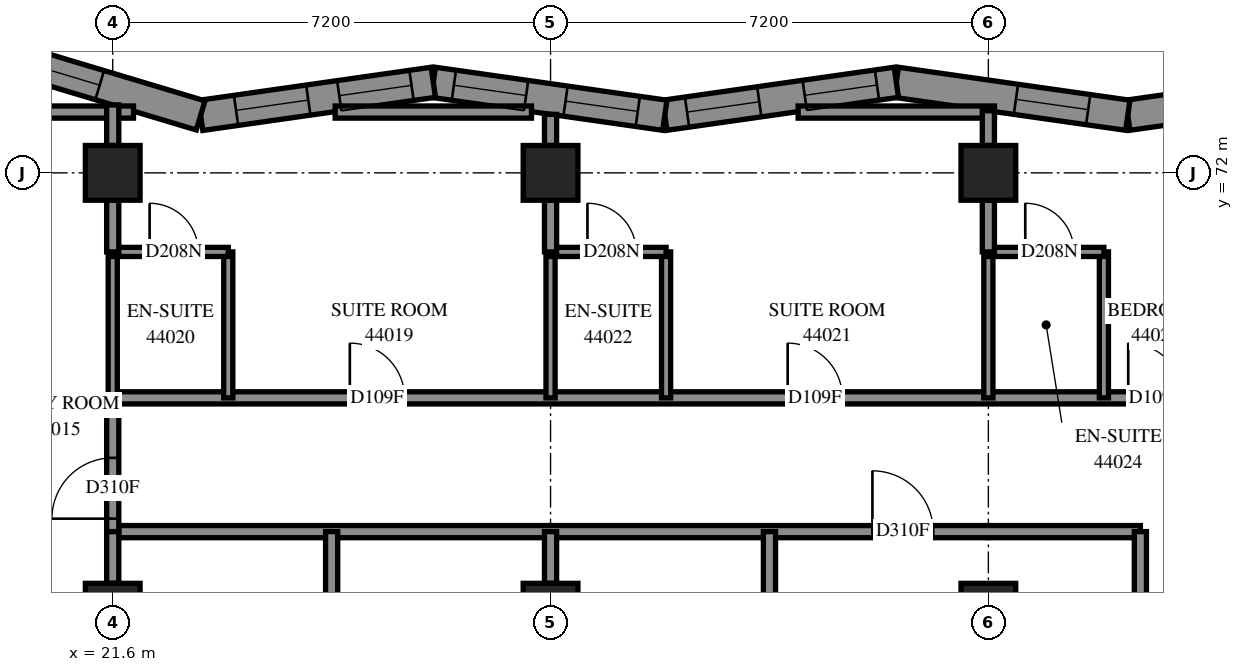
"""IFC4 building model, lengths in metres.
Left out: names, types, materials, properties, quantities, classifications, styles, units other than length and angle.
Written with IfcOpenShell. Run it as: python <this file> out.ifc"""

import sys

from ifc_helpers import new_model, si_unit, direction, frame, frame_2d, origin, origin_2d, place, context, subcontext, project, spatial, polyline, rectangle, outline, extrude, element, fill, save


model = new_model("IFC4")
c1 = context("Model", 3, precision=1e-05, world=origin(), true_north=direction((0.0, 1.0)))
c2 = subcontext(c1, "Body", "Model", "MODEL_VIEW")
j1 = project(units=[si_unit("LENGTHUNIT", "METRE"), si_unit("PLANEANGLEUNIT", "RADIAN")], contexts=[c1])
p1 = place(None, origin())
s1 = spatial("IfcSite", under=j1, at=p1, CompositionType="ELEMENT")
p2 = place(p1, origin())
s2 = spatial("IfcBuilding", under=s1, at=p2, CompositionType="ELEMENT")
p3 = place(p2, frame((0.0, 0.0, 162.6)))
s3 = spatial("IfcBuildingStorey", under=s2, at=p3, CompositionType="ELEMENT", Elevation=162.6)
for number, where, z_axis, x_axis in (
    (1, (21.6, 64.8, 0.0), (0.0, 0.0, 1.0), (1.0, 0.0, 0.0)),
    (2, (21.6, 72.0, 0.0), (0.0, 0.0, 1.0), (1.0, 0.0, 0.0)),
    (3, (28.8, 64.8, 0.0), (0.0, 0.0, 1.0), (1.0, 0.0, 0.0)),
    (4, (28.8, 72.0, 0.0), (0.0, 0.0, 1.0), (1.0, 0.0, 0.0)),
    (5, (36.0, 64.8, 0.0), (0.0, 0.0, 1.0), (1.0, 0.0, 0.0)),
    (6, (36.0, 72.0, 0.0), (0.0, 0.0, 1.0), (1.0, 0.0, 0.0)),
):
    element("IfcColumn", number, at=place(p3, frame(where, z_axis=z_axis, x_axis=x_axis)), inside=s3, PredefinedType="COLUMN", context=c2, shape_type="SweptSolid", body=[
        extrude(rectangle(XDim=0.9, YDim=0.9, at=origin_2d()), origin(), (0.0, 0.0, 1.0), 3.1),
    ])
p4 = place(p3, frame((42.1, 73.49, 0.0), z_axis=(0.0, 0.0, 1.0), x_axis=(-0.990016994, -0.1409480459, 0.0)))
e7 = element("IfcWall", 7, at=p4, inside=s3, PredefinedType="SOLIDWALL", context=c2, shape_type="SweptSolid", body=[
    extrude(outline(polyline([(-0.036, -0.25), (3.81, -0.25), (3.881, 0.25), (0.036, 0.25), (-0.036, -0.25)])), origin(), (0.0, 0.0, 1.0), 3.1),
])
p5 = place(p4, frame((0.33, 0.0, 0.45)))
e8 = element("IfcOpeningElement", 8, at=p5, cuts=e7, PredefinedType="OPENING", context=c2, shape_type="SweptSolid", body=[
    extrude(rectangle(XDim=1.2, YDim=2.5, at=frame_2d((0.6, 1.25))), frame((0.0, 0.26, 0.0), z_axis=(0.0, -1.0, 0.0), x_axis=(1.0, 0.0, 0.0)), (0.0, 0.0, 1.0), 0.52),
])
p6 = place(p3, frame((38.293, 72.948, 0.0), z_axis=(0.0, 0.0, 1.0), x_axis=(-0.990016994, 0.1409480459, 0.0)))
e9 = element("IfcWall", 9, at=p6, inside=s3, PredefinedType="SOLIDWALL", context=c2, shape_type="SweptSolid", body=[
    extrude(outline(polyline([(0.036, -0.25), (3.881, -0.25), (3.81, 0.25), (-0.036, 0.25), (0.036, -0.25)])), origin(), (0.0, 0.0, 1.0), 3.1),
])
p7 = place(p6, frame((0.658, 0.0, 0.45)))
e10 = element("IfcOpeningElement", 10, at=p7, cuts=e9, PredefinedType="OPENING", context=c2, shape_type="SweptSolid", body=[
    extrude(rectangle(XDim=1.2, YDim=2.5, at=frame_2d((0.6, 1.25))), frame((0.0, 0.26, 0.0), z_axis=(0.0, -1.0, 0.0), x_axis=(1.0, 0.0, 0.0)), (0.0, 0.0, 1.0), 0.52),
])
p8 = place(p3, frame((34.486, 73.49, 0.0), z_axis=(0.0, 0.0, 1.0), x_axis=(-0.990016994, -0.1409480459, 0.0)))
e11 = element("IfcWall", 11, at=p8, inside=s3, PredefinedType="SOLIDWALL", context=c2, shape_type="SweptSolid", body=[
    extrude(outline(polyline([(-0.036, -0.25), (3.81, -0.25), (3.881, 0.25), (0.036, 0.25), (-0.036, -0.25)])), origin(), (0.0, 0.0, 1.0), 3.1),
])
p9 = place(p8, frame((0.321, 0.0, 0.45)))
e12 = element("IfcOpeningElement", 12, at=p9, cuts=e11, PredefinedType="OPENING", context=c2, shape_type="SweptSolid", body=[
    extrude(rectangle(XDim=1.2, YDim=2.5, at=frame_2d((0.6, 1.25))), frame((0.0, 0.26, 0.0), z_axis=(0.0, -1.0, 0.0), x_axis=(1.0, 0.0, 0.0)), (0.0, 0.0, 1.0), 0.52),
])
p10 = place(p8, frame((2.276, 0.0, 0.45)))
e13 = element("IfcOpeningElement", 13, at=p10, cuts=e11, PredefinedType="OPENING", context=c2, shape_type="SweptSolid", body=[
    extrude(rectangle(XDim=1.2, YDim=2.5, at=frame_2d((0.6, 1.25))), frame((0.0, 0.26, 0.0), z_axis=(0.0, -1.0, 0.0), x_axis=(1.0, 0.0, 0.0)), (0.0, 0.0, 1.0), 0.52),
])
p11 = place(p3, frame((30.679, 72.948, 0.0), z_axis=(0.0, 0.0, 1.0), x_axis=(-0.990016994, 0.1409480459, 0.0)))
e14 = element("IfcWall", 14, at=p11, inside=s3, PredefinedType="SOLIDWALL", context=c2, shape_type="SweptSolid", body=[
    extrude(outline(polyline([(0.036, -0.25), (3.881, -0.25), (3.81, 0.25), (-0.036, 0.25), (0.036, -0.25)])), origin(), (0.0, 0.0, 1.0), 3.1),
])
p12 = place(p11, frame((0.449, 0.0, 0.45)))
e15 = element("IfcOpeningElement", 15, at=p12, cuts=e14, PredefinedType="OPENING", context=c2, shape_type="SweptSolid", body=[
    extrude(rectangle(XDim=1.2, YDim=2.5, at=frame_2d((0.6, 1.25))), frame((0.0, 0.26, 0.0), z_axis=(0.0, -1.0, 0.0), x_axis=(1.0, 0.0, 0.0)), (0.0, 0.0, 1.0), 0.52),
])
p13 = place(p11, frame((2.304, 0.0, 0.45)))
e16 = element("IfcOpeningElement", 16, at=p13, cuts=e14, PredefinedType="OPENING", context=c2, shape_type="SweptSolid", body=[
    extrude(rectangle(XDim=1.2, YDim=2.5, at=frame_2d((0.6, 1.25))), frame((0.0, 0.26, 0.0), z_axis=(0.0, -1.0, 0.0), x_axis=(1.0, 0.0, 0.0)), (0.0, 0.0, 1.0), 0.52),
])
p14 = place(p3, frame((26.872, 73.49, 0.0), z_axis=(0.0, 0.0, 1.0), x_axis=(-0.9900145925, -0.140964913, 0.0)))
e17 = element("IfcWall", 17, at=p14, inside=s3, PredefinedType="SOLIDWALL", context=c2, shape_type="SweptSolid", body=[
    extrude(outline(polyline([(-0.036, -0.25), (3.81, -0.25), (3.92, 0.25), (0.036, 0.25), (-0.036, -0.25)])), origin(), (0.0, 0.0, 1.0), 3.1),
])
p15 = place(p14, frame((0.362, 0.0, 0.45)))
e18 = element("IfcOpeningElement", 18, at=p15, cuts=e17, PredefinedType="OPENING", context=c2, shape_type="SweptSolid", body=[
    extrude(rectangle(XDim=1.2, YDim=2.5, at=frame_2d((0.6, 1.25))), frame((0.0, 0.26, 0.0), z_axis=(0.0, -1.0, 0.0), x_axis=(1.0, 0.0, 0.0)), (0.0, 0.0, 1.0), 0.52),
])
p16 = place(p14, frame((2.077, 0.0, 0.45)))
e19 = element("IfcOpeningElement", 19, at=p16, cuts=e17, PredefinedType="OPENING", context=c2, shape_type="SweptSolid", body=[
    extrude(rectangle(XDim=1.2, YDim=2.5, at=frame_2d((0.6, 1.25))), frame((0.0, 0.26, 0.0), z_axis=(0.0, -1.0, 0.0), x_axis=(1.0, 0.0, 0.0)), (0.0, 0.0, 1.0), 0.52),
])
p17 = place(p3, frame((23.046, 72.945, 0.0), z_axis=(0.0, 0.0, 1.0), x_axis=(-0.9578292658, 0.2873379501, 0.0)))
e20 = element("IfcWall", 20, at=p17, inside=s3, PredefinedType="SOLIDWALL", context=c2, shape_type="SweptSolid", body=[
    extrude(outline(polyline([(0.055, -0.25), (4.03, -0.25), (3.358, 0.25), (-0.055, 0.25), (0.055, -0.25)])), origin(), (0.0, 0.0, 1.0), 3.1),
])
p18 = place(p17, frame((1.734, 0.0, 0.45)))
e21 = element("IfcOpeningElement", 21, at=p18, cuts=e20, PredefinedType="OPENING", context=c2, shape_type="SweptSolid", body=[
    extrude(rectangle(XDim=1.2, YDim=2.5, at=frame_2d((0.6, 1.25))), frame((0.0, 0.26, 0.0), z_axis=(0.0, -1.0, 0.0), x_axis=(1.0, 0.0, 0.0)), (0.0, 0.0, 1.0), 0.52),
])
p19 = place(p3, frame((21.6, 68.3, 0.0), z_axis=(0.0, 0.0, 1.0), x_axis=(1.0, 0.0, 0.0)))
e22 = element("IfcWall", 22, at=p19, inside=s3, PredefinedType="PARTITIONING", context=c2, shape_type="SweptSolid", body=[
    extrude(rectangle(XDim=19.1, YDim=0.2, at=frame_2d((9.55, 0.0))), origin(), (0.0, 0.0, 1.0), 3.1),
])
p20 = place(p19, frame((3.899, 0.0, 0.0)))
e23 = element("IfcOpeningElement", 23, at=p20, cuts=e22, PredefinedType="OPENING", context=c2, shape_type="SweptSolid", body=[
    extrude(rectangle(XDim=0.9, YDim=2.1, at=frame_2d((0.45, 1.05))), frame((0.0, 0.11, 0.0), z_axis=(0.0, -1.0, 0.0), x_axis=(1.0, 0.0, 0.0)), (0.0, 0.0, 1.0), 0.22),
])
p21 = place(p19, frame((11.099, 0.0, 0.0)))
e24 = element("IfcOpeningElement", 24, at=p21, cuts=e22, PredefinedType="OPENING", context=c2, shape_type="SweptSolid", body=[
    extrude(rectangle(XDim=0.9, YDim=2.1, at=frame_2d((0.45, 1.05))), frame((0.0, 0.11, 0.0), z_axis=(0.0, -1.0, 0.0), x_axis=(1.0, 0.0, 0.0)), (0.0, 0.0, 1.0), 0.22),
])
p22 = place(p19, frame((16.7, 0.0, 0.0)))
e25 = element("IfcOpeningElement", 25, at=p22, cuts=e22, PredefinedType="OPENING", context=c2, shape_type="SweptSolid", body=[
    extrude(rectangle(XDim=0.9, YDim=2.1, at=frame_2d((0.45, 1.05))), frame((0.0, 0.11, 0.0), z_axis=(0.0, -1.0, 0.0), x_axis=(1.0, 0.0, 0.0)), (0.0, 0.0, 1.0), 0.22),
])
p23 = place(p3, frame((21.6, 66.1, 0.0), z_axis=(0.0, 0.0, 1.0), x_axis=(1.0, 0.0, 0.0)))
e26 = element("IfcWall", 26, at=p23, inside=s3, PredefinedType="PARTITIONING", context=c2, shape_type="SweptSolid", body=[
    extrude(rectangle(XDim=16.9, YDim=0.2, at=frame_2d((8.45, 0.0))), origin(), (0.0, 0.0, 1.0), 3.1),
])
p24 = place(p23, frame((12.493, 0.0, 0.0)))
e27 = element("IfcOpeningElement", 27, at=p24, cuts=e26, PredefinedType="OPENING", context=c2, shape_type="SweptSolid", body=[
    extrude(rectangle(XDim=1.0, YDim=2.1, at=frame_2d((0.5, 1.05))), frame((0.0, 0.11, 0.0), z_axis=(0.0, -1.0, 0.0), x_axis=(1.0, 0.0, 0.0)), (0.0, 0.0, 1.0), 0.22),
])
for number, where, z_axis, x_axis in (
    (28, (32.872, 73.0, 0.0), (0.0, 0.0, 1.0), (1.0, 0.0, 0.0)),
    (29, (25.258, 73.0, 0.0), (0.0, 0.0, 1.0), (1.0, 0.0, 0.0)),
):
    element("IfcWall", number, at=place(p3, frame(where, z_axis=z_axis, x_axis=x_axis)), inside=s3, PredefinedType="PARTITIONING", context=c2, shape_type="SweptSolid", body=[
        extrude(rectangle(XDim=3.229, YDim=0.2, at=frame_2d((1.614, 0.0))), origin(), (0.0, 0.0, 1.0), 3.1),
    ])
for number, where, z_axis, x_axis in (
    (30, (25.2, 62.958, 0.0), (0.0, 0.0, 1.0), (0.0, 1.0, 0.0)),
    (31, (32.4, 62.958, 0.0), (0.0, 0.0, 1.0), (0.0, 1.0, 0.0)),
):
    element("IfcWall", number, at=place(p3, frame(where, z_axis=z_axis, x_axis=x_axis)), inside=s3, PredefinedType="PARTITIONING", context=c2, shape_type="SweptSolid", body=[
        extrude(rectangle(XDim=3.142, YDim=0.2, at=frame_2d((1.571, 0.0))), origin(), (0.0, 0.0, 1.0), 3.1),
    ])
p25 = place(p3, frame((38.5, 63.502, 0.0), z_axis=(0.0, 0.0, 1.0), x_axis=(0.0, 1.0, 0.0)))
e32 = element("IfcWall", 32, at=p25, inside=s3, PredefinedType="PARTITIONING", context=c2, shape_type="SweptSolid", body=[
    extrude(rectangle(XDim=2.598, YDim=0.2, at=frame_2d((1.299, 0.0))), origin(), (0.0, 0.0, 1.0), 3.1),
])
p26 = place(p3, frame((21.6, 68.3, 0.0), z_axis=(0.0, 0.0, 1.0), x_axis=(0.0, 1.0, 0.0)))
e33 = element("IfcWall", 33, at=p26, inside=s3, PredefinedType="PARTITIONING", context=c2, shape_type="SweptSolid", body=[
    extrude(rectangle(XDim=2.4, YDim=0.15, at=frame_2d((1.2, 0.0))), origin(), (0.0, 0.0, 1.0), 2.6),
])
for number, where, z_axis, x_axis in (
    (34, (23.5, 68.3, 0.0), (0.0, 0.0, 1.0), (0.0, 1.0, 0.0)),
    (35, (28.8, 68.3, 0.0), (0.0, 0.0, 1.0), (0.0, 1.0, 0.0)),
    (36, (30.7, 68.3, 0.0), (0.0, 0.0, 1.0), (0.0, 1.0, 0.0)),
    (37, (37.9, 68.3, 0.0), (0.0, 0.0, 1.0), (0.0, 1.0, 0.0)),
    (38, (36.0, 68.3, 0.0), (0.0, 0.0, 1.0), (0.0, 1.0, 0.0)),
):
    element("IfcWall", number, at=place(p3, frame(where, z_axis=z_axis, x_axis=x_axis)), inside=s3, PredefinedType="PARTITIONING", context=c2, shape_type="SweptSolid", body=[
        extrude(rectangle(XDim=2.4, YDim=0.15, at=frame_2d((1.2, 0.0))), origin(), (0.0, 0.0, 1.0), 3.1),
    ])
p27 = place(p3, frame((21.6, 66.1, 0.0), z_axis=(0.0, 0.0, 1.0), x_axis=(0.0, 1.0, 0.0)))
e39 = element("IfcWall", 39, at=p27, inside=s3, PredefinedType="PARTITIONING", context=c2, shape_type="SweptSolid", body=[
    extrude(rectangle(XDim=2.2, YDim=0.2, at=frame_2d((1.1, 0.0))), origin(), (0.0, 0.0, 1.0), 2.6),
])
p28 = place(p27, frame((0.213, 0.0, 0.0)))
e40 = element("IfcOpeningElement", 40, at=p28, cuts=e39, PredefinedType="OPENING", context=c2, shape_type="SweptSolid", body=[
    extrude(rectangle(XDim=1.0, YDim=2.1, at=frame_2d((0.5, 1.05))), frame((0.0, 0.11, 0.0), z_axis=(0.0, -1.0, 0.0), x_axis=(1.0, 0.0, 0.0)), (0.0, 0.0, 1.0), 0.22),
])
p29 = place(p3, frame((19.758, 73.0, 0.0), z_axis=(0.0, 0.0, 1.0), x_axis=(1.0, 0.0, 0.0)))
e41 = element("IfcWall", 41, at=p29, inside=s3, PredefinedType="PARTITIONING", context=c2, shape_type="SweptSolid", body=[
    extrude(rectangle(XDim=2.183, YDim=0.2, at=frame_2d((1.092, 0.0))), origin(), (0.0, 0.0, 1.0), 3.1),
])
p30 = place(p3, frame((21.6, 70.7, 0.0), z_axis=(0.0, 0.0, 1.0), x_axis=(1.0, 0.0, 0.0)))
e42 = element("IfcWall", 42, at=p30, inside=s3, PredefinedType="PARTITIONING", context=c2, shape_type="SweptSolid", body=[
    extrude(rectangle(XDim=1.9, YDim=0.15, at=frame_2d((0.95, 0.0))), origin(), (0.0, 0.0, 1.0), 3.1),
])
p31 = place(p30, frame((0.607, 0.0, 0.0)))
e43 = element("IfcOpeningElement", 43, at=p31, cuts=e42, PredefinedType="OPENING", context=c2, shape_type="SweptSolid", body=[
    extrude(rectangle(XDim=0.8, YDim=2.1, at=frame_2d((0.4, 1.05))), frame((0.0, 0.085, 0.0), z_axis=(0.0, -1.0, 0.0), x_axis=(1.0, 0.0, 0.0)), (0.0, 0.0, 1.0), 0.17),
])
p32 = place(p3, frame((28.8, 70.7, 0.0), z_axis=(0.0, 0.0, 1.0), x_axis=(1.0, 0.0, 0.0)))
e44 = element("IfcWall", 44, at=p32, inside=s3, PredefinedType="PARTITIONING", context=c2, shape_type="SweptSolid", body=[
    extrude(rectangle(XDim=1.9, YDim=0.15, at=frame_2d((0.95, 0.0))), origin(), (0.0, 0.0, 1.0), 3.1),
])
p33 = place(p32, frame((0.607, 0.0, 0.0)))
e45 = element("IfcOpeningElement", 45, at=p33, cuts=e44, PredefinedType="OPENING", context=c2, shape_type="SweptSolid", body=[
    extrude(rectangle(XDim=0.8, YDim=2.1, at=frame_2d((0.4, 1.05))), frame((0.0, 0.085, 0.0), z_axis=(0.0, -1.0, 0.0), x_axis=(1.0, 0.0, 0.0)), (0.0, 0.0, 1.0), 0.17),
])
p34 = place(p3, frame((36.0, 70.7, 0.0), z_axis=(0.0, 0.0, 1.0), x_axis=(1.0, 0.0, 0.0)))
e46 = element("IfcWall", 46, at=p34, inside=s3, PredefinedType="PARTITIONING", context=c2, shape_type="SweptSolid", body=[
    extrude(rectangle(XDim=1.9, YDim=0.15, at=frame_2d((0.95, 0.0))), origin(), (0.0, 0.0, 1.0), 3.1),
])
p35 = place(p34, frame((0.607, 0.0, 0.0)))
e47 = element("IfcOpeningElement", 47, at=p35, cuts=e46, PredefinedType="OPENING", context=c2, shape_type="SweptSolid", body=[
    extrude(rectangle(XDim=0.8, YDim=2.1, at=frame_2d((0.4, 1.05))), frame((0.0, 0.085, 0.0), z_axis=(0.0, -1.0, 0.0), x_axis=(1.0, 0.0, 0.0)), (0.0, 0.0, 1.0), 0.17),
])
for number, where, z_axis, x_axis in (
    (48, (21.6, 65.25, 0.0), (0.0, 0.0, 1.0), (0.0, 1.0, 0.0)),
    (49, (21.6, 70.7, 0.0), (0.0, 0.0, 1.0), (0.0, 1.0, 0.0)),
):
    element("IfcWall", number, at=place(p3, frame(where, z_axis=z_axis, x_axis=x_axis)), inside=s3, PredefinedType="PARTITIONING", context=c2, shape_type="SweptSolid", body=[
        extrude(rectangle(XDim=0.85, YDim=0.2, at=frame_2d((0.425, 0.0))), origin(), (0.0, 0.0, 1.0), 2.6),
    ])
for number, where, z_axis, x_axis in (
    (50, (28.8, 65.25, 0.0), (0.0, 0.0, 1.0), (0.0, 1.0, 0.0)),
    (51, (28.8, 70.7, 0.0), (0.0, 0.0, 1.0), (0.0, 1.0, 0.0)),
    (52, (36.0, 70.7, 0.0), (0.0, 0.0, 1.0), (0.0, 1.0, 0.0)),
):
    element("IfcWall", number, at=place(p3, frame(where, z_axis=z_axis, x_axis=x_axis)), inside=s3, PredefinedType="PARTITIONING", context=c2, shape_type="SweptSolid", body=[
        extrude(rectangle(XDim=0.85, YDim=0.2, at=frame_2d((0.425, 0.0))), origin(), (0.0, 0.0, 1.0), 3.1),
    ])
p36 = place(p3, frame((21.6, 72.45, 0.0), z_axis=(0.0, 0.0, 1.0), x_axis=(0.0, 1.0, 0.0)))
e53 = element("IfcWall", 53, at=p36, inside=s3, PredefinedType="PARTITIONING", context=c2, shape_type="SweptSolid", body=[
    extrude(rectangle(XDim=0.667, YDim=0.2, at=frame_2d((0.334, 0.0))), origin(), (0.0, 0.0, 1.0), 3.1),
])
p37 = place(p3, frame((36.0, 72.45, 0.0), z_axis=(0.0, 0.0, 1.0), x_axis=(0.0, 1.0, 0.0)))
e54 = element("IfcWall", 54, at=p37, inside=s3, PredefinedType="PARTITIONING", context=c2, shape_type="SweptSolid", body=[
    extrude(rectangle(XDim=0.571, YDim=0.2, at=frame_2d((0.286, 0.0))), origin(), (0.0, 0.0, 1.0), 3.1),
])
p38 = place(p3, frame((28.8, 72.45, 0.0), z_axis=(0.0, 0.0, 1.0), x_axis=(0.0, 1.0, 0.0)))
e55 = element("IfcWall", 55, at=p38, inside=s3, PredefinedType="PARTITIONING", context=c2, shape_type="SweptSolid", body=[
    extrude(rectangle(XDim=0.512, YDim=0.2, at=frame_2d((0.256, 0.0))), origin(), (0.0, 0.0, 1.0), 3.1),
])
p39 = place(p7, origin())
e56 = element("IfcWindow", 56, at=p39, inside=s3, PartitioningType="SINGLE_PANEL", PredefinedType="WINDOW", context=c2, shape_type="SweptSolid", body=[
    extrude(rectangle(XDim=1.2, YDim=2.5, at=frame_2d((0.6, 1.25))), frame((0.0, 0.18, 0.0), z_axis=(0.0, -1.0, 0.0), x_axis=(1.0, 0.0, 0.0)), (0.0, 0.0, 1.0), 0.06),
])
fill(e10, e56)
p40 = place(p9, origin())
e57 = element("IfcWindow", 57, at=p40, inside=s3, PartitioningType="SINGLE_PANEL", PredefinedType="WINDOW", context=c2, shape_type="SweptSolid", body=[
    extrude(rectangle(XDim=1.2, YDim=2.5, at=frame_2d((0.6, 1.25))), frame((0.0, 0.14, 0.0), z_axis=(0.0, -1.0, 0.0), x_axis=(1.0, 0.0, 0.0)), (0.0, 0.0, 1.0), 0.06),
])
fill(e12, e57)
p41 = place(p10, origin())
e58 = element("IfcWindow", 58, at=p41, inside=s3, PartitioningType="SINGLE_PANEL", PredefinedType="WINDOW", context=c2, shape_type="SweptSolid", body=[
    extrude(rectangle(XDim=1.2, YDim=2.5, at=frame_2d((0.6, 1.25))), frame((0.0, 0.18, 0.0), z_axis=(0.0, -1.0, 0.0), x_axis=(1.0, 0.0, 0.0)), (0.0, 0.0, 1.0), 0.06),
])
fill(e13, e58)
p42 = place(p12, origin())
e59 = element("IfcWindow", 59, at=p42, inside=s3, PartitioningType="SINGLE_PANEL", PredefinedType="WINDOW", context=c2, shape_type="SweptSolid", body=[
    extrude(rectangle(XDim=1.2, YDim=2.5, at=frame_2d((0.6, 1.25))), frame((0.0, 0.18, 0.0), z_axis=(0.0, -1.0, 0.0), x_axis=(1.0, 0.0, 0.0)), (0.0, 0.0, 1.0), 0.06),
])
fill(e15, e59)
p43 = place(p13, origin())
e60 = element("IfcWindow", 60, at=p43, inside=s3, PartitioningType="SINGLE_PANEL", PredefinedType="WINDOW", context=c2, shape_type="SweptSolid", body=[
    extrude(rectangle(XDim=1.2, YDim=2.5, at=frame_2d((0.6, 1.25))), frame((0.0, 0.14, 0.0), z_axis=(0.0, -1.0, 0.0), x_axis=(1.0, 0.0, 0.0)), (0.0, 0.0, 1.0), 0.06),
])
fill(e16, e60)
p44 = place(p15, origin())
e61 = element("IfcWindow", 61, at=p44, inside=s3, PartitioningType="SINGLE_PANEL", PredefinedType="WINDOW", context=c2, shape_type="SweptSolid", body=[
    extrude(rectangle(XDim=1.2, YDim=2.5, at=frame_2d((0.6, 1.25))), frame((0.0, 0.14, 0.0), z_axis=(0.0, -1.0, 0.0), x_axis=(1.0, 0.0, 0.0)), (0.0, 0.0, 1.0), 0.06),
])
fill(e18, e61)
p45 = place(p16, origin())
e62 = element("IfcWindow", 62, at=p45, inside=s3, PartitioningType="SINGLE_PANEL", PredefinedType="WINDOW", context=c2, shape_type="SweptSolid", body=[
    extrude(rectangle(XDim=1.2, YDim=2.5, at=frame_2d((0.6, 1.25))), frame((0.0, 0.18, 0.0), z_axis=(0.0, -1.0, 0.0), x_axis=(1.0, 0.0, 0.0)), (0.0, 0.0, 1.0), 0.06),
])
fill(e19, e62)
p46 = place(p18, origin())
e63 = element("IfcWindow", 63, at=p46, inside=s3, PartitioningType="SINGLE_PANEL", PredefinedType="WINDOW", context=c2, shape_type="SweptSolid", body=[
    extrude(rectangle(XDim=1.2, YDim=2.5, at=frame_2d((0.6, 1.25))), frame((0.0, 0.18, 0.0), z_axis=(0.0, -1.0, 0.0), x_axis=(1.0, 0.0, 0.0)), (0.0, 0.0, 1.0), 0.06),
])
fill(e21, e63)
p47 = place(p28, origin())
e64 = element("IfcDoor", 64, at=p47, inside=s3, OperationType="SINGLE_SWING_LEFT", PredefinedType="DOOR", context=c2, shape_type="SweptSolid", body=[
    extrude(rectangle(XDim=1.0, YDim=2.1, at=frame_2d((0.5, 1.05))), frame((0.0, 0.025, 0.0), z_axis=(0.0, -1.0, 0.0), x_axis=(1.0, 0.0, 0.0)), (0.0, 0.0, 1.0), 0.05),
])
fill(e40, e64)
p48 = place(p20, origin())
e65 = element("IfcDoor", 65, at=p48, inside=s3, OperationType="SINGLE_SWING_RIGHT", PredefinedType="DOOR", context=c2, shape_type="SweptSolid", body=[
    extrude(rectangle(XDim=0.9, YDim=2.1, at=frame_2d((0.45, 1.05))), frame((0.0, 0.025, 0.0), z_axis=(0.0, -1.0, 0.0), x_axis=(1.0, 0.0, 0.0)), (0.0, 0.0, 1.0), 0.05),
])
fill(e23, e65)
p49 = place(p31, origin())
e66 = element("IfcDoor", 66, at=p49, inside=s3, OperationType="SINGLE_SWING_RIGHT", PredefinedType="DOOR", context=c2, shape_type="SweptSolid", body=[
    extrude(rectangle(XDim=0.8, YDim=2.1, at=frame_2d((0.4, 1.05))), frame((0.0, 0.025, 0.0), z_axis=(0.0, -1.0, 0.0), x_axis=(1.0, 0.0, 0.0)), (0.0, 0.0, 1.0), 0.05),
])
fill(e43, e66)
p50 = place(p21, origin())
e67 = element("IfcDoor", 67, at=p50, inside=s3, OperationType="SINGLE_SWING_RIGHT", PredefinedType="DOOR", context=c2, shape_type="SweptSolid", body=[
    extrude(rectangle(XDim=0.9, YDim=2.1, at=frame_2d((0.45, 1.05))), frame((0.0, 0.025, 0.0), z_axis=(0.0, -1.0, 0.0), x_axis=(1.0, 0.0, 0.0)), (0.0, 0.0, 1.0), 0.05),
])
fill(e24, e67)
p51 = place(p33, origin())
e68 = element("IfcDoor", 68, at=p51, inside=s3, OperationType="SINGLE_SWING_RIGHT", PredefinedType="DOOR", context=c2, shape_type="SweptSolid", body=[
    extrude(rectangle(XDim=0.8, YDim=2.1, at=frame_2d((0.4, 1.05))), frame((0.0, 0.025, 0.0), z_axis=(0.0, -1.0, 0.0), x_axis=(1.0, 0.0, 0.0)), (0.0, 0.0, 1.0), 0.05),
])
fill(e45, e68)
p52 = place(p22, origin())
e69 = element("IfcDoor", 69, at=p52, inside=s3, OperationType="SINGLE_SWING_RIGHT", PredefinedType="DOOR", context=c2, shape_type="SweptSolid", body=[
    extrude(rectangle(XDim=0.9, YDim=2.1, at=frame_2d((0.45, 1.05))), frame((0.0, 0.025, 0.0), z_axis=(0.0, -1.0, 0.0), x_axis=(1.0, 0.0, 0.0)), (0.0, 0.0, 1.0), 0.05),
])
fill(e25, e69)
p53 = place(p35, origin())
e70 = element("IfcDoor", 70, at=p53, inside=s3, OperationType="SINGLE_SWING_RIGHT", PredefinedType="DOOR", context=c2, shape_type="SweptSolid", body=[
    extrude(rectangle(XDim=0.8, YDim=2.1, at=frame_2d((0.4, 1.05))), frame((0.0, 0.025, 0.0), z_axis=(0.0, -1.0, 0.0), x_axis=(1.0, 0.0, 0.0)), (0.0, 0.0, 1.0), 0.05),
])
fill(e47, e70)
p54 = place(p24, origin())
e71 = element("IfcDoor", 71, at=p54, inside=s3, OperationType="SINGLE_SWING_RIGHT", PredefinedType="DOOR", context=c2, shape_type="SweptSolid", body=[
    extrude(rectangle(XDim=1.0, YDim=2.1, at=frame_2d((0.5, 1.05))), frame((0.0, 0.025, 0.0), z_axis=(0.0, -1.0, 0.0), x_axis=(1.0, 0.0, 0.0)), (0.0, 0.0, 1.0), 0.05),
])
fill(e27, e71)
save(model, sys.argv[1])
